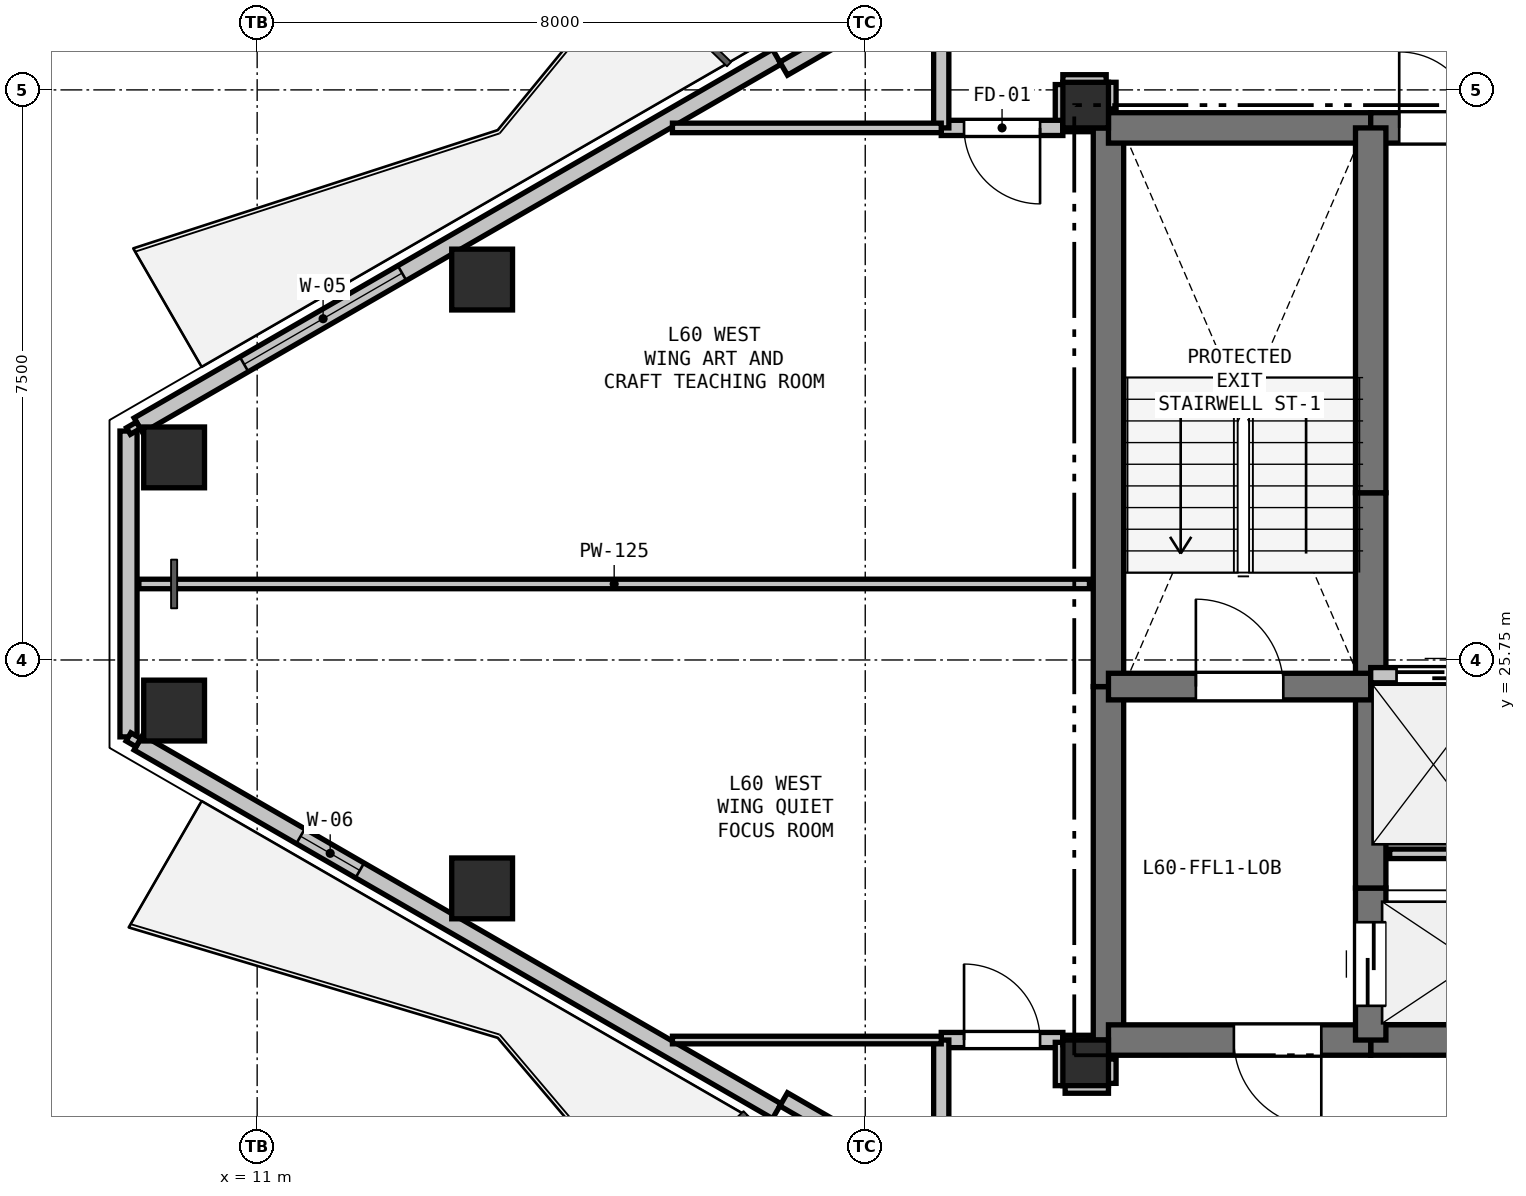
"""IFC4 building model, lengths in metres.
Left out: names, types, materials, properties, quantities, classifications, styles, units other than length and angle.
Written with IfcOpenShell. Run it as: python <this file> out.ifc"""

import sys

from ifc_helpers import new_model, si_unit, direction, frame, frame_2d, origin, origin_2d, place, context, subcontext, project, spatial, rectangle, hollow_rectangle, extrude, element, fill, save


model = new_model("IFC4")
c1 = context("Model", 3, precision=1e-05, world=origin(), true_north=direction((0.0, 1.0)))
c2 = subcontext(c1, "Body", "Model", "MODEL_VIEW")
j1 = project(units=[si_unit("LENGTHUNIT", "METRE"), si_unit("PLANEANGLEUNIT", "RADIAN")], contexts=[c1])
p1 = place(None, origin())
s1 = spatial("IfcSite", under=j1, at=p1, CompositionType="ELEMENT")
p2 = place(p1, origin())
s2 = spatial("IfcBuilding", under=s1, at=p2, CompositionType="ELEMENT")
p3 = place(p2, frame((0.0, 0.0, 215.1)))
s3 = spatial("IfcBuildingStorey", under=s2, at=p3, CompositionType="ELEMENT", Elevation=215.1)
for number, where, z_axis, x_axis in (
    (1, (21.9, 20.45, 0.0), (0.0, 0.0, 1.0), (1.0, 0.0, 0.0)),
    (2, (21.9, 33.05, 0.0), (0.0, 0.0, 1.0), (1.0, 0.0, 0.0)),
):
    element("IfcColumn", number, at=place(p3, frame(where, z_axis=z_axis, x_axis=x_axis)), inside=s3, PredefinedType="COLUMN", context=c2, shape_type="SweptSolid", body=[
        extrude(rectangle(XDim=0.6, YDim=0.6, at=origin_2d()), origin(), (0.0, 0.0, 1.0), 3.3),
    ])
for number, where, z_axis, x_axis in (
    (3, (9.907, 28.415, 0.0), (0.0, 0.0, 1.0), (1.0, 0.0, 0.0)),
    (4, (13.96, 30.755, 0.0), (0.0, 0.0, 1.0), (1.0, 0.0, 0.0)),
    (5, (13.96, 22.745, 0.0), (0.0, 0.0, 1.0), (1.0, 0.0, 0.0)),
    (6, (9.907, 25.085, 0.0), (0.0, 0.0, 1.0), (1.0, 0.0, 0.0)),
):
    element("IfcColumn", number, at=place(p3, frame(where, z_axis=z_axis, x_axis=x_axis)), inside=s3, PredefinedType="COLUMN", context=c2, shape_type="SweptSolid", body=[
        extrude(hollow_rectangle(XDim=0.8, YDim=0.8, WallThickness=0.025, at=origin_2d()), origin(), (0.0, 0.0, 1.0), 3.3),
    ])
p4 = place(p3, frame((9.308, 24.738, 0.0), z_axis=(0.0, 0.0, 1.0), x_axis=(0.0, 1.0, 0.0)))
e7 = element("IfcWall", 7, at=p4, inside=s3, PredefinedType="SOLIDWALL", context=c2, shape_type="SweptSolid", body=[
    extrude(rectangle(XDim=4.023, YDim=0.225, at=frame_2d((2.012, 0.0))), origin(), (0.0, 0.0, 1.0), 2.64),
])
p5 = place(p3, frame((9.438, 28.837, 0.0), z_axis=(0.0, 0.0, 1.0), x_axis=(0.866027133173, 0.499997004599, 0.0)))
e8 = element("IfcWall", 8, at=p5, inside=s3, PredefinedType="SOLIDWALL", context=c2, shape_type="SweptSolid", body=[
    extrude(rectangle(XDim=9.699, YDim=0.225, at=frame_2d((4.849, 0.0))), origin(), (0.0, 0.0, 1.0), 2.64),
])
p6 = place(p5, frame((1.606, 0.0, 0.9)))
e9 = element("IfcOpeningElement", 9, at=p6, cuts=e8, PredefinedType="OPENING", context=c2, shape_type="SweptSolid", body=[
    extrude(rectangle(XDim=2.4, YDim=1.6, at=frame_2d((1.2, 0.8))), frame((0.0, 0.123, 0.0), z_axis=(0.0, -1.0, 0.0), x_axis=(1.0, 0.0, 0.0)), (0.0, 0.0, 1.0), 0.245),
])
p7 = place(p3, frame((17.927, 33.53, 0.0), z_axis=(0.0, 0.0, 1.0), x_axis=(0.86605165483, 0.499954529098, 0.0)))
e10 = element("IfcWall", 10, at=p7, inside=s3, PredefinedType="PARAPET", context=c2, shape_type="SweptSolid", body=[
    extrude(rectangle(XDim=1.7, YDim=0.2, at=frame_2d((0.85, 0.0))), origin(), (0.0, 0.0, 1.0), 2.64),
])
p8 = place(p3, frame((17.837, 19.814, 0.0), z_axis=(0.0, 0.0, 1.0), x_axis=(-0.866027133173, 0.499997004599, 0.0)))
e11 = element("IfcWall", 11, at=p8, inside=s3, PredefinedType="SOLIDWALL", context=c2, shape_type="SweptSolid", body=[
    extrude(rectangle(XDim=9.699, YDim=0.225, at=frame_2d((4.849, 0.0))), origin(), (0.0, 0.0, 1.0), 2.64),
])
p9 = place(p8, frame((6.335, 0.0, 0.9)))
e12 = element("IfcOpeningElement", 12, at=p9, cuts=e11, PredefinedType="OPENING", context=c2, shape_type="SweptSolid", body=[
    extrude(rectangle(XDim=0.9, YDim=1.4, at=frame_2d((0.45, 0.7))), frame((0.0, 0.123, 0.0), z_axis=(0.0, -1.0, 0.0), x_axis=(1.0, 0.0, 0.0)), (0.0, 0.0, 1.0), 0.245),
])
p10 = place(p3, frame((19.399, 19.12, 0.0), z_axis=(0.0, 0.0, 1.0), x_axis=(-0.86605165483, 0.499954529098, 0.0)))
e13 = element("IfcWall", 13, at=p10, inside=s3, PredefinedType="PARAPET", context=c2, shape_type="SweptSolid", body=[
    extrude(rectangle(XDim=1.7, YDim=0.2, at=frame_2d((0.85, 0.0))), origin(), (0.0, 0.0, 1.0), 2.64),
])
p11 = place(p3, frame((22.2, 20.75, 0.0), z_axis=(0.0, 0.0, 1.0), x_axis=(0.0, 1.0, 0.0)))
e14 = element("IfcWall", 14, at=p11, inside=s3, PredefinedType="SHEAR", context=c2, shape_type="SweptSolid", body=[
    extrude(rectangle(XDim=4.65, YDim=0.4, at=frame_2d((2.325, 0.0))), origin(), (0.0, 0.0, 1.0), 3.02),
])
p12 = place(p3, frame((22.2, 25.4, 0.0), z_axis=(0.0, 0.0, 1.0), x_axis=(0.0, 1.0, 0.0)))
e15 = element("IfcWall", 15, at=p12, inside=s3, PredefinedType="SHEAR", context=c2, shape_type="SweptSolid", body=[
    extrude(rectangle(XDim=7.35, YDim=0.4, at=frame_2d((3.675, 0.0))), origin(), (0.0, 0.0, 1.0), 3.02),
])
p13 = place(p3, frame((22.2, 32.75, 0.0), z_axis=(0.0, 0.0, 1.0), x_axis=(1.0, 0.0, 0.0)))
e16 = element("IfcWall", 16, at=p13, inside=s3, PredefinedType="SHEAR", context=c2, shape_type="SweptSolid", body=[
    extrude(rectangle(XDim=3.45, YDim=0.4, at=frame_2d((1.725, 0.0))), origin(), (0.0, 0.0, 1.0), 3.02),
])
p14 = place(p3, frame((25.65, 32.75, 0.0), z_axis=(0.0, 0.0, 1.0), x_axis=(1.0, 0.0, 0.0)))
e17 = element("IfcWall", 17, at=p14, inside=s3, PredefinedType="SHEAR", context=c2, shape_type="SweptSolid", body=[
    extrude(rectangle(XDim=1.75, YDim=0.4, at=frame_2d((0.875, 0.0))), origin(), (0.0, 0.0, 1.0), 3.02),
])
p15 = place(p14, frame((0.375, 0.0, 0.0)))
e18 = element("IfcOpeningElement", 18, at=p15, cuts=e17, PredefinedType="OPENING", context=c2, shape_type="SweptSolid", body=[
    extrude(rectangle(XDim=1.0, YDim=2.15, at=frame_2d((0.5, 1.075))), frame((0.0, 0.21, 0.0), z_axis=(0.0, -1.0, 0.0), x_axis=(1.0, 0.0, 0.0)), (0.0, 0.0, 1.0), 0.42),
])
p16 = place(p3, frame((28.35, 20.75, 0.0), z_axis=(0.0, 0.0, 1.0), x_axis=(-1.0, 0.0, 0.0)))
e19 = element("IfcWall", 19, at=p16, inside=s3, PredefinedType="SHEAR", context=c2, shape_type="SweptSolid", body=[
    extrude(rectangle(XDim=2.7, YDim=0.4, at=frame_2d((1.35, 0.0))), origin(), (0.0, 0.0, 1.0), 3.02),
])
p17 = place(p3, frame((25.65, 20.75, 0.0), z_axis=(0.0, 0.0, 1.0), x_axis=(-1.0, 0.0, 0.0)))
e20 = element("IfcWall", 20, at=p17, inside=s3, PredefinedType="SHEAR", context=c2, shape_type="SweptSolid", body=[
    extrude(rectangle(XDim=3.45, YDim=0.4, at=frame_2d((1.725, 0.0))), origin(), (0.0, 0.0, 1.0), 3.02),
])
p18 = place(p17, frame((0.65, 0.0, 0.0)))
e21 = element("IfcOpeningElement", 21, at=p18, cuts=e20, PredefinedType="OPENING", context=c2, shape_type="SweptSolid", body=[
    extrude(rectangle(XDim=1.15, YDim=2.15, at=frame_2d((0.575, 1.075))), frame((0.0, 0.21, 0.0), z_axis=(0.0, -1.0, 0.0), x_axis=(1.0, 0.0, 0.0)), (0.0, 0.0, 1.0), 0.42),
])
p19 = place(p3, frame((25.65, 20.75, 0.0), z_axis=(0.0, 0.0, 1.0), x_axis=(0.0, 1.0, 0.0)))
e22 = element("IfcWall", 22, at=p19, inside=s3, PredefinedType="SHEAR", context=c2, shape_type="SweptSolid", body=[
    extrude(rectangle(XDim=2.0, YDim=0.4, at=frame_2d((1.0, 0.0))), origin(), (0.0, 0.0, 1.0), 3.02),
])
p20 = place(p19, frame((0.45, 0.0, 0.0)))
e23 = element("IfcOpeningElement", 23, at=p20, cuts=e22, PredefinedType="OPENING", context=c2, shape_type="SweptSolid", body=[
    extrude(rectangle(XDim=1.1, YDim=2.15, at=frame_2d((0.55, 1.075))), frame((0.0, 0.21, 0.0), z_axis=(0.0, -1.0, 0.0), x_axis=(1.0, 0.0, 0.0)), (0.0, 0.0, 1.0), 0.42),
])
p21 = place(p3, frame((25.65, 22.75, 0.0), z_axis=(0.0, 0.0, 1.0), x_axis=(0.0, 1.0, 0.0)))
e24 = element("IfcWall", 24, at=p21, inside=s3, PredefinedType="SHEAR", context=c2, shape_type="SweptSolid", body=[
    extrude(rectangle(XDim=2.8, YDim=0.4, at=frame_2d((1.4, 0.0))), origin(), (0.0, 0.0, 1.0), 3.02),
])
p22 = place(p3, frame((25.65, 25.55, 0.0), z_axis=(0.0, 0.0, 1.0), x_axis=(0.0, 1.0, 0.0)))
e25 = element("IfcWall", 25, at=p22, inside=s3, PredefinedType="SHEAR", context=c2, shape_type="SweptSolid", body=[
    extrude(rectangle(XDim=2.4, YDim=0.4, at=frame_2d((1.2, 0.0))), origin(), (0.0, 0.0, 1.0), 3.02),
])
p23 = place(p3, frame((25.65, 27.95, 0.0), z_axis=(0.0, 0.0, 1.0), x_axis=(0.0, 1.0, 0.0)))
e26 = element("IfcWall", 26, at=p23, inside=s3, PredefinedType="SHEAR", context=c2, shape_type="SweptSolid", body=[
    extrude(rectangle(XDim=4.8, YDim=0.4, at=frame_2d((2.4, 0.0))), origin(), (0.0, 0.0, 1.0), 3.02),
])
p24 = place(p3, frame((22.2, 25.4, 0.0), z_axis=(0.0, 0.0, 1.0), x_axis=(1.0, 0.0, 0.0)))
e27 = element("IfcWall", 27, at=p24, inside=s3, PredefinedType="SHEAR", context=c2, shape_type="SweptSolid", body=[
    extrude(rectangle(XDim=3.45, YDim=0.35, at=frame_2d((1.725, 0.0))), origin(), (0.0, 0.0, 1.0), 3.02),
])
p25 = place(p24, frame((1.15, 0.0, 0.0)))
e28 = element("IfcOpeningElement", 28, at=p25, cuts=e27, PredefinedType="OPENING", context=c2, shape_type="SweptSolid", body=[
    extrude(rectangle(XDim=1.15, YDim=2.15, at=frame_2d((0.575, 1.075))), frame((0.0, 0.185, 0.0), z_axis=(0.0, -1.0, 0.0), x_axis=(1.0, 0.0, 0.0)), (0.0, 0.0, 1.0), 0.37),
])
p26 = place(p3, frame((25.65, 25.55, 0.0), z_axis=(0.0, 0.0, 1.0), x_axis=(1.0, 0.0, 0.0)))
e29 = element("IfcWall", 29, at=p26, inside=s3, PredefinedType="PARTITIONING", context=c2, shape_type="SweptSolid", body=[
    extrude(rectangle(XDim=4.95, YDim=0.2, at=frame_2d((2.475, 0.0))), origin(), (0.0, 0.0, 1.0), 3.02),
])
p27 = place(p26, frame((0.34, 0.0, 0.0)))
e30 = element("IfcOpeningElement", 30, at=p27, cuts=e29, PredefinedType="OPENING", context=c2, shape_type="SweptSolid", body=[
    extrude(rectangle(XDim=1.1, YDim=2.15, at=frame_2d((0.55, 1.075))), frame((0.0, 0.11, 0.0), z_axis=(0.0, -1.0, 0.0), x_axis=(1.0, 0.0, 0.0)), (0.0, 0.0, 1.0), 0.22),
])
p28 = place(p26, frame((1.99, 0.0, 0.0)))
e31 = element("IfcOpeningElement", 31, at=p28, cuts=e29, PredefinedType="OPENING", context=c2, shape_type="SweptSolid", body=[
    extrude(rectangle(XDim=1.1, YDim=2.15, at=frame_2d((0.55, 1.075))), frame((0.0, 0.11, 0.0), z_axis=(0.0, -1.0, 0.0), x_axis=(1.0, 0.0, 0.0)), (0.0, 0.0, 1.0), 0.22),
])
p29 = place(p26, frame((3.64, 0.0, 0.0)))
e32 = element("IfcOpeningElement", 32, at=p29, cuts=e29, PredefinedType="OPENING", context=c2, shape_type="SweptSolid", body=[
    extrude(rectangle(XDim=1.1, YDim=2.15, at=frame_2d((0.55, 1.075))), frame((0.0, 0.11, 0.0), z_axis=(0.0, -1.0, 0.0), x_axis=(1.0, 0.0, 0.0)), (0.0, 0.0, 1.0), 0.22),
])
p30 = place(p3, frame((25.9, 23.2, 0.0), z_axis=(0.0, 0.0, 1.0), x_axis=(1.0, 0.0, 0.0)))
e33 = element("IfcWall", 33, at=p30, inside=s3, PredefinedType="PARTITIONING", context=c2, shape_type="SweptSolid", body=[
    extrude(rectangle(XDim=1.4, YDim=0.125, at=frame_2d((0.7, 0.0))), origin(), (0.0, 0.0, 1.0), 3.02),
])
p31 = place(p3, frame((22.2, 33.0, 0.0), z_axis=(0.0, 0.0, 1.0), x_axis=(0.0, 1.0, 0.0)))
e34 = element("IfcWall", 34, at=p31, inside=s3, PredefinedType="PARTITIONING", context=c2, shape_type="SweptSolid", body=[
    extrude(rectangle(XDim=0.35, YDim=0.2, at=frame_2d((0.175, 0.0))), origin(), (0.0, 0.0, 1.0), 2.545),
])
p32 = place(p3, frame((22.17, 33.35, 0.0), z_axis=(0.0, 0.0, 1.0), x_axis=(-1.0, 0.0, 0.0)))
e35 = element("IfcWall", 35, at=p32, inside=s3, PredefinedType="PARTITIONING", context=c2, shape_type="SweptSolid", body=[
    extrude(rectangle(XDim=0.57, YDim=0.2, at=frame_2d((0.285, 0.0))), origin(), (0.0, 0.0, 1.0), 3.02),
])
p33 = place(p3, frame((21.6, 33.32, 0.0), z_axis=(0.0, 0.0, 1.0), x_axis=(0.0, -1.0, 0.0)))
e36 = element("IfcWall", 36, at=p33, inside=s3, PredefinedType="PARTITIONING", context=c2, shape_type="SweptSolid", body=[
    extrude(rectangle(XDim=0.57, YDim=0.2, at=frame_2d((0.285, 0.0))), origin(), (0.0, 0.0, 1.0), 2.468),
])
p34 = place(p3, frame((21.6, 32.75, 0.0), z_axis=(0.0, 0.0, 1.0), x_axis=(-1.0, 0.0, 0.0)))
e37 = element("IfcWall", 37, at=p34, inside=s3, PredefinedType="PARTITIONING", context=c2, shape_type="SweptSolid", body=[
    extrude(rectangle(XDim=1.6, YDim=0.2, at=frame_2d((0.8, 0.0))), origin(), (0.0, 0.0, 1.0), 2.468),
])
p35 = place(p34, frame((0.3, 0.0, 0.0)))
e38 = element("IfcOpeningElement", 38, at=p35, cuts=e37, PredefinedType="OPENING", context=c2, shape_type="SweptSolid", body=[
    extrude(rectangle(XDim=1.0, YDim=2.15, at=frame_2d((0.5, 1.075))), frame((0.0, 0.11, 0.0), z_axis=(0.0, -1.0, 0.0), x_axis=(1.0, 0.0, 0.0)), (0.0, 0.0, 1.0), 0.22),
])
p36 = place(p3, frame((20.0, 32.75, 0.0), z_axis=(0.0, 0.0, 1.0), x_axis=(0.0, 1.0, 0.0)))
e39 = element("IfcWall", 39, at=p36, inside=s3, PredefinedType="PARTITIONING", context=c2, shape_type="SweptSolid", body=[
    extrude(rectangle(XDim=2.141, YDim=0.2, at=frame_2d((1.071, 0.0))), origin(), (0.0, 0.0, 1.0), 2.365),
])
p37 = place(p3, frame((20.0, 20.75, 0.0), z_axis=(0.0, 0.0, 1.0), x_axis=(1.0, 0.0, 0.0)))
e40 = element("IfcWall", 40, at=p37, inside=s3, PredefinedType="PARTITIONING", context=c2, shape_type="SweptSolid", body=[
    extrude(rectangle(XDim=1.6, YDim=0.2, at=frame_2d((0.8, 0.0))), origin(), (0.0, 0.0, 1.0), 2.468),
])
p38 = place(p37, frame((0.3, 0.0, 0.0)))
e41 = element("IfcOpeningElement", 41, at=p38, cuts=e40, PredefinedType="OPENING", context=c2, shape_type="SweptSolid", body=[
    extrude(rectangle(XDim=1.0, YDim=2.15, at=frame_2d((0.5, 1.075))), frame((0.0, 0.11, 0.0), z_axis=(0.0, -1.0, 0.0), x_axis=(1.0, 0.0, 0.0)), (0.0, 0.0, 1.0), 0.22),
])
for number, where, z_axis, x_axis in (
    (42, (21.6, 20.72, 0.0), (0.0, 0.0, 1.0), (0.0, -1.0, 0.0)),
    (43, (21.63, 20.15, 0.0), (0.0, 0.0, 1.0), (1.0, 0.0, 0.0)),
):
    element("IfcWall", number, at=place(p3, frame(where, z_axis=z_axis, x_axis=x_axis)), inside=s3, PredefinedType="PARTITIONING", context=c2, shape_type="SweptSolid", body=[
        extrude(rectangle(XDim=0.57, YDim=0.2, at=frame_2d((0.285, 0.0))), origin(), (0.0, 0.0, 1.0), 2.468),
    ])
p39 = place(p3, frame((22.2, 20.18, 0.0), z_axis=(0.0, 0.0, 1.0), x_axis=(0.0, 1.0, 0.0)))
e44 = element("IfcWall", 44, at=p39, inside=s3, PredefinedType="PARTITIONING", context=c2, shape_type="SweptSolid", body=[
    extrude(rectangle(XDim=0.32, YDim=0.2, at=frame_2d((0.16, 0.0))), origin(), (0.0, 0.0, 1.0), 2.468),
])
p40 = place(p3, frame((20.0, 18.609, 0.0), z_axis=(0.0, 0.0, 1.0), x_axis=(0.0, 1.0, 0.0)))
e45 = element("IfcWall", 45, at=p40, inside=s3, PredefinedType="PARTITIONING", context=c2, shape_type="SweptSolid", body=[
    extrude(rectangle(XDim=2.141, YDim=0.2, at=frame_2d((1.071, 0.0))), origin(), (0.0, 0.0, 1.0), 2.365),
])
p41 = place(p3, frame((16.464, 32.75, 0.0), z_axis=(0.0, 0.0, 1.0), x_axis=(1.0, 0.0, 0.0)))
e46 = element("IfcWall", 46, at=p41, inside=s3, PredefinedType="PARTITIONING", context=c2, shape_type="SweptSolid", body=[
    extrude(rectangle(XDim=3.536, YDim=0.125, at=frame_2d((1.768, 0.0))), origin(), (0.0, 0.0, 1.0), 2.365),
])
p42 = place(p3, frame((21.6, 32.75, 0.0), z_axis=(0.0, 0.0, 1.0), x_axis=(1.0, 0.0, 0.0)))
e47 = element("IfcWall", 47, at=p42, inside=s3, PredefinedType="PARTITIONING", context=c2, shape_type="SweptSolid", body=[
    extrude(rectangle(XDim=0.35, YDim=0.1, at=frame_2d((0.175, 0.0))), origin(), (0.0, 0.0, 1.0), 2.545),
])
p43 = place(p3, frame((21.95, 26.75, 0.0), z_axis=(0.0, 0.0, 1.0), x_axis=(-1.0, 0.0, 0.0)))
e48 = element("IfcWall", 48, at=p43, inside=s3, PredefinedType="PARTITIONING", context=c2, shape_type="SweptSolid", body=[
    extrude(rectangle(XDim=12.506, YDim=0.125, at=frame_2d((6.253, 0.0))), origin(), (0.0, 0.0, 1.0), 2.545),
])
p44 = place(p3, frame((9.307, 28.762, 0.0), z_axis=(0.0, 0.0, 1.0), x_axis=(0.865833797362, 0.500331725305, 0.0)))
e49 = element("IfcWall", 49, at=p44, inside=s3, PredefinedType="PARTITIONING", context=c2, shape_type="SweptSolid", body=[
    extrude(rectangle(XDim=0.15, YDim=0.1, at=frame_2d((0.075, 0.0))), origin(), (0.0, 0.0, 1.0), 3.02),
])
p45 = place(p3, frame((21.95, 20.75, 0.0), z_axis=(0.0, 0.0, 1.0), x_axis=(-1.0, 0.0, 0.0)))
e50 = element("IfcWall", 50, at=p45, inside=s3, PredefinedType="PARTITIONING", context=c2, shape_type="SweptSolid", body=[
    extrude(rectangle(XDim=0.35, YDim=0.125, at=frame_2d((0.175, 0.0))), origin(), (0.0, 0.0, 1.0), 2.545),
])
p46 = place(p3, frame((20.0, 20.75, 0.0), z_axis=(0.0, 0.0, 1.0), x_axis=(-1.0, 0.0, 0.0)))
e51 = element("IfcWall", 51, at=p46, inside=s3, PredefinedType="PARTITIONING", context=c2, shape_type="SweptSolid", body=[
    extrude(rectangle(XDim=3.536, YDim=0.1, at=frame_2d((1.768, 0.0))), origin(), (0.0, 0.0, 1.0), 2.365),
])
p47 = place(p3, frame((9.437, 24.663, 0.0), z_axis=(0.0, 0.0, 1.0), x_axis=(-0.865833797362, 0.500331725305, 0.0)))
e52 = element("IfcWall", 52, at=p47, inside=s3, PredefinedType="PARTITIONING", context=c2, shape_type="SweptSolid", body=[
    extrude(rectangle(XDim=0.15, YDim=0.125, at=frame_2d((0.075, 0.0))), origin(), (0.0, 0.0, 1.0), 3.02),
])
p48 = place(p6, origin())
e53 = element("IfcWindow", 53, at=p48, inside=s3, PartitioningType="SINGLE_PANEL", PredefinedType="WINDOW", context=c2, shape_type="SweptSolid", body=[
    extrude(rectangle(XDim=2.4, YDim=1.6, at=frame_2d((1.2, 0.8))), frame((0.0, 0.03, 0.0), z_axis=(0.0, -1.0, 0.0), x_axis=(1.0, 0.0, 0.0)), (0.0, 0.0, 1.0), 0.06),
])
fill(e9, e53)
p49 = place(p9, origin())
e54 = element("IfcWindow", 54, at=p49, inside=s3, PartitioningType="SINGLE_PANEL", PredefinedType="WINDOW", context=c2, shape_type="SweptSolid", body=[
    extrude(rectangle(XDim=0.9, YDim=1.4, at=frame_2d((0.45, 0.7))), frame((0.0, 0.03, 0.0), z_axis=(0.0, -1.0, 0.0), x_axis=(1.0, 0.0, 0.0)), (0.0, 0.0, 1.0), 0.06),
])
fill(e12, e54)
p50 = place(p27, origin())
e55 = element("IfcDoor", 55, at=p50, inside=s3, OperationType="SLIDING_TO_LEFT", PredefinedType="DOOR", context=c2, shape_type="SweptSolid", body=[
    extrude(rectangle(XDim=1.1, YDim=2.15, at=frame_2d((0.55, 1.075))), frame((0.0, 0.025, 0.0), z_axis=(0.0, -1.0, 0.0), x_axis=(1.0, 0.0, 0.0)), (0.0, 0.0, 1.0), 0.05),
])
fill(e30, e55)
p51 = place(p15, origin())
e56 = element("IfcDoor", 56, at=p51, inside=s3, OperationType="SINGLE_SWING_LEFT", PredefinedType="DOOR", context=c2, shape_type="SweptSolid", body=[
    extrude(rectangle(XDim=1.0, YDim=2.15, at=frame_2d((0.5, 1.075))), frame((0.0, 0.025, 0.0), z_axis=(0.0, -1.0, 0.0), x_axis=(1.0, 0.0, 0.0)), (0.0, 0.0, 1.0), 0.05),
])
fill(e18, e56)
p52 = place(p20, origin())
e57 = element("IfcDoor", 57, at=p52, inside=s3, OperationType="SLIDING_TO_LEFT", PredefinedType="DOOR", context=c2, shape_type="SweptSolid", body=[
    extrude(rectangle(XDim=1.1, YDim=2.15, at=frame_2d((0.55, 1.075))), frame((0.0, 0.025, 0.0), z_axis=(0.0, -1.0, 0.0), x_axis=(1.0, 0.0, 0.0)), (0.0, 0.0, 1.0), 0.05),
])
fill(e23, e57)
p53 = place(p25, origin())
e58 = element("IfcDoor", 58, at=p53, inside=s3, OperationType="SINGLE_SWING_LEFT", PredefinedType="DOOR", context=c2, shape_type="SweptSolid", body=[
    extrude(rectangle(XDim=1.15, YDim=2.15, at=frame_2d((0.575, 1.075))), frame((0.0, 0.025, 0.0), z_axis=(0.0, -1.0, 0.0), x_axis=(1.0, 0.0, 0.0)), (0.0, 0.0, 1.0), 0.05),
])
fill(e28, e58)
p54 = place(p18, origin())
e59 = element("IfcDoor", 59, at=p54, inside=s3, OperationType="SINGLE_SWING_LEFT", PredefinedType="DOOR", context=c2, shape_type="SweptSolid", body=[
    extrude(rectangle(XDim=1.15, YDim=2.15, at=frame_2d((0.575, 1.075))), frame((0.0, 0.025, 0.0), z_axis=(0.0, -1.0, 0.0), x_axis=(1.0, 0.0, 0.0)), (0.0, 0.0, 1.0), 0.05),
])
fill(e21, e59)
p55 = place(p35, origin())
e60 = element("IfcDoor", 60, at=p55, inside=s3, OperationType="SINGLE_SWING_LEFT", PredefinedType="DOOR", context=c2, shape_type="SweptSolid", body=[
    extrude(rectangle(XDim=1.0, YDim=2.15, at=frame_2d((0.5, 1.075))), frame((0.0, 0.025, 0.0), z_axis=(0.0, -1.0, 0.0), x_axis=(1.0, 0.0, 0.0)), (0.0, 0.0, 1.0), 0.05),
])
fill(e38, e60)
p56 = place(p38, origin())
e61 = element("IfcDoor", 61, at=p56, inside=s3, OperationType="SINGLE_SWING_LEFT", PredefinedType="DOOR", context=c2, shape_type="SweptSolid", body=[
    extrude(rectangle(XDim=1.0, YDim=2.15, at=frame_2d((0.5, 1.075))), frame((0.0, 0.025, 0.0), z_axis=(0.0, -1.0, 0.0), x_axis=(1.0, 0.0, 0.0)), (0.0, 0.0, 1.0), 0.05),
])
fill(e41, e61)
save(model, sys.argv[1])
